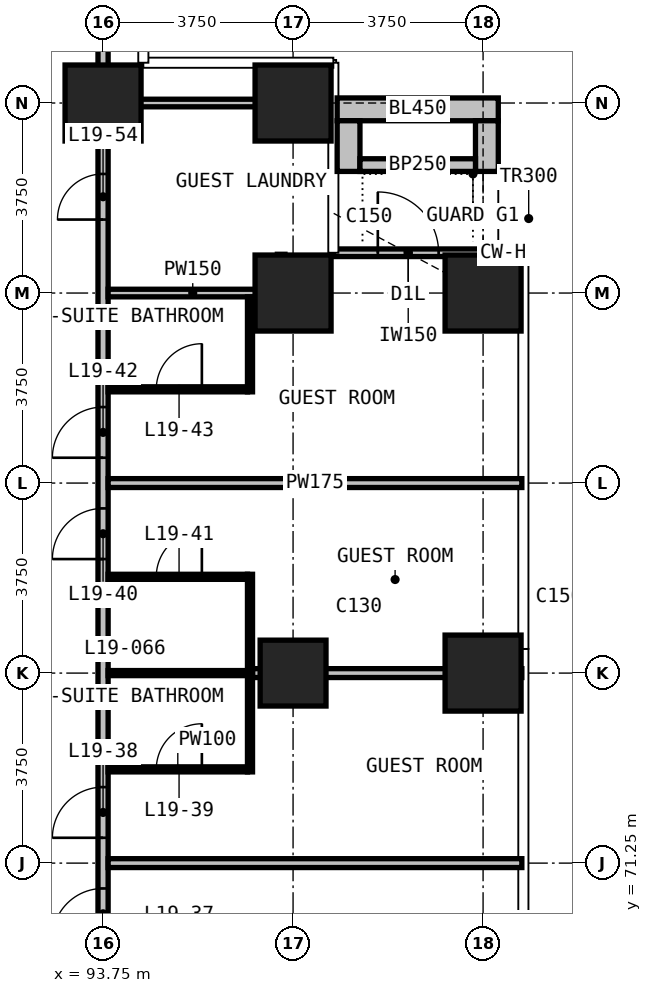
"""IFC4 building model, lengths in metres.
Left out: names, types, materials, properties, quantities, classifications, styles, units other than length and angle.
Written with IfcOpenShell. Run it as: python <this file> out.ifc"""

import sys

from ifc_helpers import new_model, si_unit, direction, frame, frame_2d, origin, origin_2d, place, context, subcontext, project, spatial, rectangle, extrude, element, fill, save


model = new_model("IFC4")
c1 = context("Model", 3, precision=1e-05, world=origin(), true_north=direction((0.0, 1.0)))
c2 = subcontext(c1, "Body", "Model", "MODEL_VIEW")
j1 = project(units=[si_unit("LENGTHUNIT", "METRE"), si_unit("PLANEANGLEUNIT", "RADIAN")], contexts=[c1])
p1 = place(None, origin())
s1 = spatial("IfcSite", under=j1, at=p1, CompositionType="ELEMENT")
p2 = place(p1, origin())
s2 = spatial("IfcBuilding", under=s1, at=p2, CompositionType="ELEMENT")
p3 = place(p2, frame((0.0, 0.0, 82.4)))
s3 = spatial("IfcBuildingStorey", under=s2, at=p3, CompositionType="ELEMENT", Elevation=82.4)
p4 = place(p3, frame((93.75, 86.25, 0.0), z_axis=(0.0, 0.0, 1.0), x_axis=(1.0, 0.0, 0.0)))
e1 = element("IfcColumn", 1, at=p4, inside=s3, PredefinedType="COLUMN", context=c2, shape_type="SweptSolid", body=[
    extrude(rectangle(XDim=1.5, YDim=1.5, at=origin_2d()), origin(), (0.0, 0.0, 1.0), 3.3),
])
p5 = place(p3, frame((97.5, 75.0, 0.0), z_axis=(0.0, 0.0, 1.0), x_axis=(1.0, 0.0, 0.0)))
e2 = element("IfcColumn", 2, at=p5, inside=s3, PredefinedType="COLUMN", context=c2, shape_type="SweptSolid", body=[
    extrude(rectangle(XDim=1.3, YDim=1.3, at=origin_2d()), origin(), (0.0, 0.0, 1.0), 3.3),
])
for number, where, z_axis, x_axis in (
    (3, (97.5, 82.5, 0.0), (0.0, 0.0, 1.0), (1.0, 0.0, 0.0)),
    (4, (97.5, 86.25, 0.0), (0.0, 0.0, 1.0), (1.0, 0.0, 0.0)),
    (5, (101.25, 75.0, 0.0), (0.0, 0.0, 1.0), (1.0, 0.0, 0.0)),
    (6, (101.25, 82.5, 0.0), (0.0, 0.0, 1.0), (1.0, 0.0, 0.0)),
):
    element("IfcColumn", number, at=place(p3, frame(where, z_axis=z_axis, x_axis=x_axis)), inside=s3, PredefinedType="COLUMN", context=c2, shape_type="SweptSolid", body=[
        extrude(rectangle(XDim=1.5, YDim=1.5, at=origin_2d()), origin(), (0.0, 0.0, 1.0), 3.3),
    ])
p6 = place(p3, frame((98.295, 83.295, 0.0), z_axis=(0.0, 0.0, 1.0), x_axis=(1.0, 0.0, 0.0)))
e7 = element("IfcWall", 7, at=p6, inside=s3, PredefinedType="SOLIDWALL", context=c2, shape_type="SweptSolid", body=[
    extrude(rectangle(XDim=2.955, YDim=0.15, at=frame_2d((1.478, 0.0))), origin(), (0.0, 0.0, 1.0), 3.0),
])
p7 = place(p6, frame((0.877, 0.0, 0.0)))
e8 = element("IfcOpeningElement", 8, at=p7, cuts=e7, PredefinedType="OPENING", context=c2, shape_type="SweptSolid", body=[
    extrude(rectangle(XDim=1.2, YDim=2.0, at=frame_2d((0.6, 1.0))), frame((0.0, 0.085, 0.0), z_axis=(0.0, -1.0, 0.0), x_axis=(1.0, 0.0, 0.0)), (0.0, 0.0, 1.0), 0.17),
])
p8 = place(p3, frame((98.37, 86.125, 0.0), z_axis=(0.0, 0.0, 1.0), x_axis=(1.0, 0.0, 0.0)))
e9 = element("IfcWall", 9, at=p8, inside=s3, PredefinedType="USERDEFINED", context=c2, shape_type="SweptSolid", body=[
    extrude(rectangle(XDim=3.18, YDim=0.45, at=frame_2d((1.59, 0.0))), origin(), (0.0, 0.0, 1.0), 1.1),
])
for number, where, z_axis, x_axis in (
    (10, (98.595, 84.9, 0.0), (0.0, 0.0, 1.0), (0.0, 1.0, 0.0)),
    (11, (101.325, 84.9, 0.0), (0.0, 0.0, 1.0), (0.0, 1.0, 0.0)),
):
    element("IfcWall", number, at=place(p3, frame(where, z_axis=z_axis, x_axis=x_axis)), inside=s3, PredefinedType="USERDEFINED", context=c2, shape_type="SweptSolid", body=[
        extrude(rectangle(XDim=1.0, YDim=0.45, at=frame_2d((0.5, 0.0))), origin(), (0.0, 0.0, 1.0), 1.1),
    ])
p9 = place(p3, frame((98.82, 85.025, 0.0), z_axis=(0.0, 0.0, 1.0), x_axis=(1.0, 0.0, 0.0)))
e12 = element("IfcWall", 12, at=p9, inside=s3, PredefinedType="USERDEFINED", context=c2, shape_type="SweptSolid", body=[
    extrude(rectangle(XDim=2.28, YDim=0.25, at=frame_2d((1.14, 0.0))), origin(), (0.0, 0.0, 1.0), 1.0),
])
p10 = place(p3, frame((93.75, 52.4, 0.0), z_axis=(0.0, 0.0, 1.0), x_axis=(0.0, 1.0, 0.0)))
e13 = element("IfcWall", 13, at=p10, inside=s3, PredefinedType="PARTITIONING", context=c2, shape_type="SweptSolid", body=[
    extrude(rectangle(XDim=33.925, YDim=0.2, at=frame_2d((16.962, 0.0))), origin(), (0.0, 0.0, 1.0), 3.0),
])
p11 = place(p10, frame((2.35, 0.0, 0.0)))
e14 = element("IfcOpeningElement", 14, at=p11, cuts=e13, PredefinedType="OPENING", context=c2, shape_type="SweptSolid", body=[
    extrude(rectangle(XDim=1.0, YDim=2.2, at=frame_2d((0.5, 1.1))), frame((0.0, 0.11, 0.0), z_axis=(0.0, -1.0, 0.0), x_axis=(1.0, 0.0, 0.0)), (0.0, 0.0, 1.0), 0.22),
])
p12 = place(p10, frame((4.35, 0.0, 0.0)))
e15 = element("IfcOpeningElement", 15, at=p12, cuts=e13, PredefinedType="OPENING", context=c2, shape_type="SweptSolid", body=[
    extrude(rectangle(XDim=1.0, YDim=2.2, at=frame_2d((0.5, 1.1))), frame((0.0, 0.11, 0.0), z_axis=(0.0, -1.0, 0.0), x_axis=(1.0, 0.0, 0.0)), (0.0, 0.0, 1.0), 0.22),
])
p13 = place(p10, frame((9.85, 0.0, 0.0)))
e16 = element("IfcOpeningElement", 16, at=p13, cuts=e13, PredefinedType="OPENING", context=c2, shape_type="SweptSolid", body=[
    extrude(rectangle(XDim=1.0, YDim=2.2, at=frame_2d((0.5, 1.1))), frame((0.0, 0.11, 0.0), z_axis=(0.0, -1.0, 0.0), x_axis=(1.0, 0.0, 0.0)), (0.0, 0.0, 1.0), 0.22),
])
p14 = place(p10, frame((11.85, 0.0, 0.0)))
e17 = element("IfcOpeningElement", 17, at=p14, cuts=e13, PredefinedType="OPENING", context=c2, shape_type="SweptSolid", body=[
    extrude(rectangle(XDim=1.0, YDim=2.2, at=frame_2d((0.5, 1.1))), frame((0.0, 0.11, 0.0), z_axis=(0.0, -1.0, 0.0), x_axis=(1.0, 0.0, 0.0)), (0.0, 0.0, 1.0), 0.22),
])
p15 = place(p10, frame((17.35, 0.0, 0.0)))
e18 = element("IfcOpeningElement", 18, at=p15, cuts=e13, PredefinedType="OPENING", context=c2, shape_type="SweptSolid", body=[
    extrude(rectangle(XDim=1.0, YDim=2.2, at=frame_2d((0.5, 1.1))), frame((0.0, 0.11, 0.0), z_axis=(0.0, -1.0, 0.0), x_axis=(1.0, 0.0, 0.0)), (0.0, 0.0, 1.0), 0.22),
])
p16 = place(p10, frame((19.35, 0.0, 0.0)))
e19 = element("IfcOpeningElement", 19, at=p16, cuts=e13, PredefinedType="OPENING", context=c2, shape_type="SweptSolid", body=[
    extrude(rectangle(XDim=1.0, YDim=2.2, at=frame_2d((0.5, 1.1))), frame((0.0, 0.11, 0.0), z_axis=(0.0, -1.0, 0.0), x_axis=(1.0, 0.0, 0.0)), (0.0, 0.0, 1.0), 0.22),
])
p17 = place(p10, frame((24.85, 0.0, 0.0)))
e20 = element("IfcOpeningElement", 20, at=p17, cuts=e13, PredefinedType="OPENING", context=c2, shape_type="SweptSolid", body=[
    extrude(rectangle(XDim=1.0, YDim=2.2, at=frame_2d((0.5, 1.1))), frame((0.0, 0.11, 0.0), z_axis=(0.0, -1.0, 0.0), x_axis=(1.0, 0.0, 0.0)), (0.0, 0.0, 1.0), 0.22),
])
p18 = place(p10, frame((26.85, 0.0, 0.0)))
e21 = element("IfcOpeningElement", 21, at=p18, cuts=e13, PredefinedType="OPENING", context=c2, shape_type="SweptSolid", body=[
    extrude(rectangle(XDim=1.0, YDim=2.2, at=frame_2d((0.5, 1.1))), frame((0.0, 0.11, 0.0), z_axis=(0.0, -1.0, 0.0), x_axis=(1.0, 0.0, 0.0)), (0.0, 0.0, 1.0), 0.22),
])
p19 = place(p10, frame((31.55, 0.0, 0.0)))
e22 = element("IfcOpeningElement", 22, at=p19, cuts=e13, PredefinedType="OPENING", context=c2, shape_type="SweptSolid", body=[
    extrude(rectangle(XDim=0.9, YDim=2.2, at=frame_2d((0.45, 1.1))), frame((0.0, 0.11, 0.0), z_axis=(0.0, -1.0, 0.0), x_axis=(1.0, 0.0, 0.0)), (0.0, 0.0, 1.0), 0.22),
])
p20 = place(p3, frame((93.75, 86.28, 0.0), z_axis=(0.0, 0.0, 1.0), x_axis=(0.0, 1.0, 0.0)))
e23 = element("IfcWall", 23, at=p20, inside=s3, PredefinedType="PARTITIONING", context=c2, shape_type="SweptSolid", body=[
    extrude(rectangle(XDim=4.365, YDim=0.2, at=frame_2d((2.183, 0.0))), origin(), (0.0, 0.0, 1.0), 3.0),
])
p21 = place(p3, frame((93.85, 71.25, 0.0), z_axis=(0.0, 0.0, 1.0), x_axis=(1.0, 0.0, 0.0)))
e24 = element("IfcWall", 24, at=p21, inside=s3, PredefinedType="PARTITIONING", context=c2, shape_type="SweptSolid", body=[
    extrude(rectangle(XDim=8.165, YDim=0.175, at=frame_2d((4.083, 0.0))), origin(), (0.0, 0.0, 1.0), 3.0),
])
p22 = place(p3, frame((96.7, 75.0, 0.0), z_axis=(0.0, 0.0, 1.0), x_axis=(1.0, 0.0, 0.0)))
e25 = element("IfcWall", 25, at=p22, inside=s3, PredefinedType="PARTITIONING", context=c2, shape_type="SweptSolid", body=[
    extrude(rectangle(XDim=5.315, YDim=0.175, at=frame_2d((2.657, 0.0))), origin(), (0.0, 0.0, 1.0), 3.0),
])
p23 = place(p3, frame((93.85, 78.75, 0.0), z_axis=(0.0, 0.0, 1.0), x_axis=(1.0, 0.0, 0.0)))
e26 = element("IfcWall", 26, at=p23, inside=s3, PredefinedType="PARTITIONING", context=c2, shape_type="SweptSolid", body=[
    extrude(rectangle(XDim=8.165, YDim=0.175, at=frame_2d((4.083, 0.0))), origin(), (0.0, 0.0, 1.0), 3.0),
])
p24 = place(p3, frame((93.85, 82.5, 0.0), z_axis=(0.0, 0.0, 1.0), x_axis=(1.0, 0.0, 0.0)))
e27 = element("IfcWall", 27, at=p24, inside=s3, PredefinedType="PARTITIONING", context=c2, shape_type="SweptSolid", body=[
    extrude(rectangle(XDim=3.34, YDim=0.15, at=frame_2d((1.67, 0.0))), origin(), (0.0, 0.0, 1.0), 3.0),
])
p25 = place(p3, frame((93.85, 86.25, 0.0), z_axis=(0.0, 0.0, 1.0), x_axis=(1.0, 0.0, 0.0)))
e28 = element("IfcWall", 28, at=p25, inside=s3, PredefinedType="PARTITIONING", context=c2, shape_type="SweptSolid", body=[
    extrude(rectangle(XDim=4.295, YDim=0.15, at=frame_2d((2.147, 0.0))), origin(), (0.0, 0.0, 1.0), 3.0),
])
p26 = place(p3, frame((97.265, 82.425, 0.0), z_axis=(0.0, 0.0, 1.0), x_axis=(0.0, 1.0, 0.0)))
e29 = element("IfcWall", 29, at=p26, inside=s3, PredefinedType="PARTITIONING", context=c2, shape_type="SweptSolid", body=[
    extrude(rectangle(XDim=0.84, YDim=0.15, at=frame_2d((0.42, 0.0))), origin(), (0.0, 0.0, 1.0), 3.0),
])
p27 = place(p3, frame((93.85, 73.1, 0.0), z_axis=(0.0, 0.0, 1.0), x_axis=(1.0, 0.0, 0.0)))
e30 = element("IfcWall", 30, at=p27, inside=s3, PredefinedType="PARTITIONING", context=c2, shape_type="SweptSolid", body=[
    extrude(rectangle(XDim=2.75, YDim=0.1, at=frame_2d((1.375, 0.0))), origin(), (0.0, 0.0, 1.0), 3.0),
])
p28 = place(p27, frame((0.95, 0.0, 0.0)))
e31 = element("IfcOpeningElement", 31, at=p28, cuts=e30, PredefinedType="OPENING", context=c2, shape_type="SweptSolid", body=[
    extrude(rectangle(XDim=0.9, YDim=2.2, at=frame_2d((0.45, 1.1))), frame((0.0, 0.06, 0.0), z_axis=(0.0, -1.0, 0.0), x_axis=(1.0, 0.0, 0.0)), (0.0, 0.0, 1.0), 0.12),
])
p29 = place(p3, frame((93.85, 75.0, 0.0), z_axis=(0.0, 0.0, 1.0), x_axis=(1.0, 0.0, 0.0)))
e32 = element("IfcWall", 32, at=p29, inside=s3, PredefinedType="PARTITIONING", context=c2, shape_type="SweptSolid", body=[
    extrude(rectangle(XDim=2.75, YDim=0.1, at=frame_2d((1.375, 0.0))), origin(), (0.0, 0.0, 1.0), 3.0),
])
p30 = place(p3, frame((93.85, 76.9, 0.0), z_axis=(0.0, 0.0, 1.0), x_axis=(1.0, 0.0, 0.0)))
e33 = element("IfcWall", 33, at=p30, inside=s3, PredefinedType="PARTITIONING", context=c2, shape_type="SweptSolid", body=[
    extrude(rectangle(XDim=2.75, YDim=0.1, at=frame_2d((1.375, 0.0))), origin(), (0.0, 0.0, 1.0), 3.0),
])
p31 = place(p30, frame((0.95, 0.0, 0.0)))
e34 = element("IfcOpeningElement", 34, at=p31, cuts=e33, PredefinedType="OPENING", context=c2, shape_type="SweptSolid", body=[
    extrude(rectangle(XDim=0.9, YDim=2.2, at=frame_2d((0.45, 1.1))), frame((0.0, 0.06, 0.0), z_axis=(0.0, -1.0, 0.0), x_axis=(1.0, 0.0, 0.0)), (0.0, 0.0, 1.0), 0.12),
])
p32 = place(p3, frame((93.85, 80.6, 0.0), z_axis=(0.0, 0.0, 1.0), x_axis=(1.0, 0.0, 0.0)))
e35 = element("IfcWall", 35, at=p32, inside=s3, PredefinedType="PARTITIONING", context=c2, shape_type="SweptSolid", body=[
    extrude(rectangle(XDim=2.75, YDim=0.1, at=frame_2d((1.375, 0.0))), origin(), (0.0, 0.0, 1.0), 3.0),
])
p33 = place(p32, frame((0.95, 0.0, 0.0)))
e36 = element("IfcOpeningElement", 36, at=p33, cuts=e35, PredefinedType="OPENING", context=c2, shape_type="SweptSolid", body=[
    extrude(rectangle(XDim=0.9, YDim=2.2, at=frame_2d((0.45, 1.1))), frame((0.0, 0.06, 0.0), z_axis=(0.0, -1.0, 0.0), x_axis=(1.0, 0.0, 0.0)), (0.0, 0.0, 1.0), 0.12),
])
p34 = place(p3, frame((96.65, 73.05, 0.0), z_axis=(0.0, 0.0, 1.0), x_axis=(0.0, 1.0, 0.0)))
e37 = element("IfcWall", 37, at=p34, inside=s3, PredefinedType="PARTITIONING", context=c2, shape_type="SweptSolid", body=[
    extrude(rectangle(XDim=3.9, YDim=0.1, at=frame_2d((1.95, 0.0))), origin(), (0.0, 0.0, 1.0), 3.0),
])
p35 = place(p3, frame((96.65, 80.55, 0.0), z_axis=(0.0, 0.0, 1.0), x_axis=(0.0, 1.0, 0.0)))
e38 = element("IfcWall", 38, at=p35, inside=s3, PredefinedType="PARTITIONING", context=c2, shape_type="SweptSolid", body=[
    extrude(rectangle(XDim=1.875, YDim=0.1, at=frame_2d((0.938, 0.0))), origin(), (0.0, 0.0, 1.0), 3.0),
])
p36 = place(p7, origin())
e39 = element("IfcDoor", 39, at=p36, inside=s3, OperationType="SINGLE_SWING_LEFT", PredefinedType="DOOR", context=c2, shape_type="SweptSolid", body=[
    extrude(rectangle(XDim=1.2, YDim=2.0, at=frame_2d((0.6, 1.0))), frame((0.0, 0.025, 0.0), z_axis=(0.0, -1.0, 0.0), x_axis=(1.0, 0.0, 0.0)), (0.0, 0.0, 1.0), 0.05),
])
fill(e8, e39)
p37 = place(p15, origin())
e40 = element("IfcDoor", 40, at=p37, inside=s3, OperationType="SINGLE_SWING_LEFT", PredefinedType="DOOR", context=c2, shape_type="SweptSolid", body=[
    extrude(rectangle(XDim=1.0, YDim=2.2, at=frame_2d((0.5, 1.1))), frame((0.0, 0.025, 0.0), z_axis=(0.0, -1.0, 0.0), x_axis=(1.0, 0.0, 0.0)), (0.0, 0.0, 1.0), 0.05),
])
fill(e18, e40)
p38 = place(p16, origin())
e41 = element("IfcDoor", 41, at=p38, inside=s3, OperationType="SINGLE_SWING_RIGHT", PredefinedType="DOOR", context=c2, shape_type="SweptSolid", body=[
    extrude(rectangle(XDim=1.0, YDim=2.2, at=frame_2d((0.5, 1.1))), frame((0.0, 0.025, 0.0), z_axis=(0.0, -1.0, 0.0), x_axis=(1.0, 0.0, 0.0)), (0.0, 0.0, 1.0), 0.05),
])
fill(e19, e41)
p39 = place(p28, origin())
e42 = element("IfcDoor", 42, at=p39, inside=s3, OperationType="SINGLE_SWING_RIGHT", PredefinedType="DOOR", context=c2, shape_type="SweptSolid", body=[
    extrude(rectangle(XDim=0.9, YDim=2.2, at=frame_2d((0.45, 1.1))), frame((0.0, 0.025, 0.0), z_axis=(0.0, -1.0, 0.0), x_axis=(1.0, 0.0, 0.0)), (0.0, 0.0, 1.0), 0.05),
])
fill(e31, e42)
p40 = place(p17, origin())
e43 = element("IfcDoor", 43, at=p40, inside=s3, OperationType="SINGLE_SWING_LEFT", PredefinedType="DOOR", context=c2, shape_type="SweptSolid", body=[
    extrude(rectangle(XDim=1.0, YDim=2.2, at=frame_2d((0.5, 1.1))), frame((0.0, 0.025, 0.0), z_axis=(0.0, -1.0, 0.0), x_axis=(1.0, 0.0, 0.0)), (0.0, 0.0, 1.0), 0.05),
])
fill(e20, e43)
p41 = place(p31, origin())
e44 = element("IfcDoor", 44, at=p41, inside=s3, OperationType="SINGLE_SWING_RIGHT", PredefinedType="DOOR", context=c2, shape_type="SweptSolid", body=[
    extrude(rectangle(XDim=0.9, YDim=2.2, at=frame_2d((0.45, 1.1))), frame((0.0, 0.025, 0.0), z_axis=(0.0, -1.0, 0.0), x_axis=(1.0, 0.0, 0.0)), (0.0, 0.0, 1.0), 0.05),
])
fill(e34, e44)
p42 = place(p18, origin())
e45 = element("IfcDoor", 45, at=p42, inside=s3, OperationType="SINGLE_SWING_LEFT", PredefinedType="DOOR", context=c2, shape_type="SweptSolid", body=[
    extrude(rectangle(XDim=1.0, YDim=2.2, at=frame_2d((0.5, 1.1))), frame((0.0, 0.025, 0.0), z_axis=(0.0, -1.0, 0.0), x_axis=(1.0, 0.0, 0.0)), (0.0, 0.0, 1.0), 0.05),
])
fill(e21, e45)
p43 = place(p33, origin())
e46 = element("IfcDoor", 46, at=p43, inside=s3, OperationType="SINGLE_SWING_RIGHT", PredefinedType="DOOR", context=c2, shape_type="SweptSolid", body=[
    extrude(rectangle(XDim=0.9, YDim=2.2, at=frame_2d((0.45, 1.1))), frame((0.0, 0.025, 0.0), z_axis=(0.0, -1.0, 0.0), x_axis=(1.0, 0.0, 0.0)), (0.0, 0.0, 1.0), 0.05),
])
fill(e36, e46)
p44 = place(p19, origin())
e47 = element("IfcDoor", 47, at=p44, inside=s3, OperationType="SINGLE_SWING_RIGHT", PredefinedType="DOOR", context=c2, shape_type="SweptSolid", body=[
    extrude(rectangle(XDim=0.9, YDim=2.2, at=frame_2d((0.45, 1.1))), frame((0.0, 0.025, 0.0), z_axis=(0.0, -1.0, 0.0), x_axis=(1.0, 0.0, 0.0)), (0.0, 0.0, 1.0), 0.05),
])
fill(e22, e47)
save(model, sys.argv[1])
